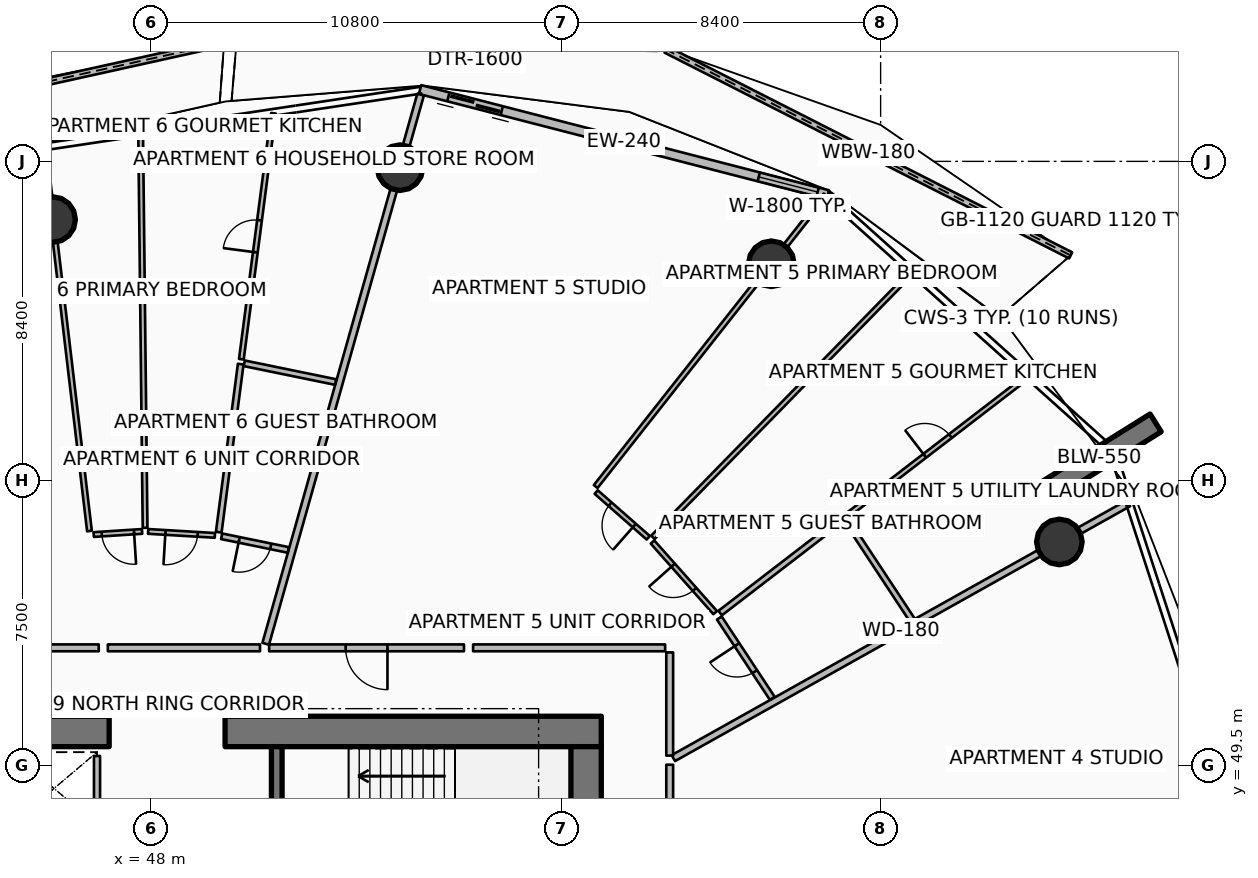
"""IFC4 building model, lengths in metres.
Left out: names, types, materials, properties, quantities, classifications, styles, units other than length and angle.
Written with IfcOpenShell. Run it as: python <this file> out.ifc"""

import sys

from ifc_helpers import new_model, si_unit, direction, frame, frame_2d, origin, origin_2d, place, context, subcontext, project, spatial, polyline, rectangle, circle, outline, extrude, element, fill, save


model = new_model("IFC4")
c1 = context("Model", 3, precision=1e-05, world=origin(), true_north=direction((0.0, 1.0)))
c2 = subcontext(c1, "Body", "Model", "MODEL_VIEW")
j1 = project(units=[si_unit("LENGTHUNIT", "METRE"), si_unit("PLANEANGLEUNIT", "RADIAN")], contexts=[c1])
p1 = place(None, origin())
s1 = spatial("IfcSite", under=j1, at=p1, CompositionType="ELEMENT")
p2 = place(p1, origin())
s2 = spatial("IfcBuilding", under=s1, at=p2, CompositionType="ELEMENT")
p3 = place(p2, frame((0.0, 0.0, 78.9)))
s3 = spatial("IfcBuildingStorey", under=s2, at=p3, CompositionType="ELEMENT", Elevation=78.9)
p4 = place(p3, frame((37.0, 50.4, 0.0), z_axis=(0.0, 0.0, 1.0), x_axis=(1.0, 0.0, 0.0)))
e1 = element("IfcWall", 1, at=p4, inside=s3, PredefinedType="SHEAR", context=c2, shape_type="SweptSolid", body=[
    extrude(rectangle(XDim=9.9, YDim=0.8, at=frame_2d((4.95, 0.0))), origin(), (0.0, 0.0, 1.0), 3.75),
])
p5 = place(p3, frame((49.95, 50.4, 0.0), z_axis=(0.0, 0.0, 1.0), x_axis=(1.0, 0.0, 0.0)))
e2 = element("IfcWall", 2, at=p5, inside=s3, PredefinedType="SHEAR", context=c2, shape_type="SweptSolid", body=[
    extrude(rectangle(XDim=9.9, YDim=0.8, at=frame_2d((4.95, 0.0))), origin(), (0.0, 0.0, 1.0), 3.75),
])
p6 = place(p3, frame((59.45, 34.0, 0.0), z_axis=(0.0, 0.0, 1.0), x_axis=(0.0, 1.0, 0.0)))
e3 = element("IfcWall", 3, at=p6, inside=s3, PredefinedType="SHEAR", context=c2, shape_type="SweptSolid", body=[
    extrude(rectangle(XDim=16.0, YDim=0.8, at=frame_2d((8.0, 0.0))), origin(), (0.0, 0.0, 1.0), 3.75),
])
p7 = place(p3, frame((51.31, 46.5, 0.0), z_axis=(0.0, 0.0, 1.0), x_axis=(0.0, 1.0, 0.0)))
e4 = element("IfcWall", 4, at=p7, inside=s3, PredefinedType="SHEAR", context=c2, shape_type="SweptSolid", body=[
    extrude(rectangle(XDim=3.5, YDim=0.28, at=frame_2d((1.75, 0.0))), origin(), (0.0, 0.0, 1.0), 3.75),
])
p8 = place(p3, frame((71.469, 56.665, 0.0), z_axis=(0.0, 0.0, 1.0), x_axis=(0.848053161125, 0.529911158502, 0.0)))
e5 = element("IfcWall", 5, at=p8, inside=s3, PredefinedType="SOLIDWALL", context=c2, shape_type="SweptSolid", body=[
    extrude(rectangle(XDim=3.5, YDim=0.55, at=frame_2d((1.75, 0.0))), origin(), (0.0, 0.0, 1.0), 3.75),
])
for number, where, z_axis, x_axis in (
    (6, (71.903, 55.386, 0.0), (0.0, 0.0, 1.0), (1.0, 0.0, 0.0)),
    (7, (64.323, 62.706, 0.0), (0.0, 0.0, 1.0), (1.0, 0.0, 0.0)),
    (8, (54.553, 65.234, 0.0), (0.0, 0.0, 1.0), (1.0, 0.0, 0.0)),
    (9, (45.412, 63.869, 0.0), (0.0, 0.0, 1.0), (1.0, 0.0, 0.0)),
):
    element("IfcColumn", number, at=place(p3, frame(where, z_axis=z_axis, x_axis=x_axis)), inside=s3, PredefinedType="COLUMN", context=c2, shape_type="SweptSolid", body=[
        extrude(circle(Radius=0.6, at=origin_2d()), origin(), (0.0, 0.0, 1.0), 3.5),
    ])
p9 = place(p3, frame((72.201, 62.926, 0.0), z_axis=(0.0, 0.0, 1.0), x_axis=(-0.891327308183, 0.453360375074, 0.0)))
e10 = element("IfcWall", 10, at=p9, inside=s3, PredefinedType="PARAPET", context=c2, shape_type="SweptSolid", body=[
    extrude(outline(polyline([(0.0, 0.0), (11.943, 0.0), (11.942, 1.348), (5.971, 1.562), (0.0, 1.747), (0.0, 0.0)])), frame((0.0, 0.09, 0.0), z_axis=(0.0, -1.0, 0.0), x_axis=(1.0, 0.0, 0.0)), (0.0, 0.0, 1.0), 0.18),
])
p10 = place(p3, frame((49.925, 68.527, 0.0), z_axis=(0.0, 0.0, 1.0), x_axis=(-0.976378265654, -0.216068235423, 0.0)))
e11 = element("IfcWall", 11, at=p10, inside=s3, PredefinedType="PARAPET", context=c2, shape_type="SweptSolid", body=[
    extrude(outline(polyline([(0.0, 0.0), (9.955, 0.0), (9.955, 1.348), (4.977, 1.182), (0.0, 1.12), (0.0, 0.0)])), frame((0.0, 0.09, 0.0), z_axis=(0.0, -1.0, 0.0), x_axis=(1.0, 0.0, 0.0)), (0.0, 0.0, 1.0), 0.18),
])
p11 = place(p3, frame((65.814, 64.523, 0.0), z_axis=(0.0, 0.0, 1.0), x_axis=(-0.968356180858, 0.249572248045, 0.0)))
e12 = element("IfcWall", 12, at=p11, inside=s3, PredefinedType="SOLIDWALL", context=c2, shape_type="SweptSolid", body=[
    extrude(rectangle(XDim=11.084, YDim=0.24, at=frame_2d((5.542, 0.0))), origin(), (0.0, 0.0, 1.0), 2.45),
])
p12 = place(p11, frame((8.865, 0.0, 0.0)))
e13 = element("IfcOpeningElement", 13, at=p12, cuts=e12, PredefinedType="OPENING", context=c2, shape_type="SweptSolid", body=[
    extrude(rectangle(XDim=1.45, YDim=2.15, at=frame_2d((0.725, 1.075))), frame((0.0, 0.13, 0.0), z_axis=(0.0, -1.0, 0.0), x_axis=(1.0, 0.0, 0.0)), (0.0, 0.0, 1.0), 0.26),
])
p13 = place(p11, frame((0.28, 0.0, 0.65)))
e14 = element("IfcOpeningElement", 14, at=p13, cuts=e12, PredefinedType="OPENING", context=c2, shape_type="SweptSolid", body=[
    extrude(rectangle(XDim=1.6, YDim=1.5, at=frame_2d((0.8, 0.75))), frame((0.0, 0.13, 0.0), z_axis=(0.0, -1.0, 0.0), x_axis=(1.0, 0.0, 0.0)), (0.0, 0.0, 1.0), 0.26),
])
p14 = place(p3, frame((46.58, 48.045, 0.0), z_axis=(0.0, 0.0, 1.0), x_axis=(0.0, 1.0, 0.0)))
e15 = element("IfcWall", 15, at=p14, inside=s3, PredefinedType="PARTITIONING", context=c2, shape_type="SweptSolid", body=[
    extrude(rectangle(XDim=1.71, YDim=0.16, at=frame_2d((0.855, 0.0))), origin(), (0.0, 0.0, 1.0), 3.5),
])
p15 = place(p3, frame((61.746, 49.698, 0.0), z_axis=(0.0, 0.0, 1.0), x_axis=(0.872489938668, 0.488632077256, 0.0)))
e16 = element("IfcWall", 16, at=p15, inside=s3, PredefinedType="PARTITIONING", context=c2, shape_type="SweptSolid", body=[
    extrude(rectangle(XDim=13.725, YDim=0.18, at=frame_2d((6.862, 0.0))), origin(), (0.0, 0.0, 1.0), 2.94),
])
p16 = place(p3, frame((51.019, 52.706, 0.0), z_axis=(0.0, 0.0, 1.0), x_axis=(0.271450895995, 0.962452290279, 0.0)))
e17 = element("IfcWall", 17, at=p16, inside=s3, PredefinedType="PARTITIONING", context=c2, shape_type="SweptSolid", body=[
    extrude(rectangle(XDim=15.014, YDim=0.18, at=frame_2d((7.507, 0.0))), origin(), (0.0, 0.0, 1.0), 2.94),
])
p17 = place(p3, frame((61.65, 43.736, 0.0), z_axis=(0.0, 0.0, 1.0), x_axis=(0.0, 1.0, 0.0)))
e18 = element("IfcWall", 18, at=p17, inside=s3, PredefinedType="PARTITIONING", context=c2, shape_type="SweptSolid", body=[
    extrude(rectangle(XDim=5.789, YDim=0.18, at=frame_2d((2.895, 0.0))), origin(), (0.0, 0.0, 1.0), 2.94),
])
p18 = place(p17, frame((2.344, 0.0, 0.0)))
e19 = element("IfcOpeningElement", 19, at=p18, cuts=e18, PredefinedType="OPENING", context=c2, shape_type="SweptSolid", body=[
    extrude(rectangle(XDim=1.1, YDim=2.1, at=frame_2d((0.55, 1.05))), frame((0.0, 0.1, 0.0), z_axis=(0.0, -1.0, 0.0), x_axis=(1.0, 0.0, 0.0)), (0.0, 0.0, 1.0), 0.2),
])
p19 = place(p3, frame((56.236, 52.6, 0.0), z_axis=(0.0, 0.0, 1.0), x_axis=(-1.0, 0.0, 0.0)))
e20 = element("IfcWall", 20, at=p19, inside=s3, PredefinedType="PARTITIONING", context=c2, shape_type="SweptSolid", body=[
    extrude(rectangle(XDim=5.127, YDim=0.18, at=frame_2d((2.563, 0.0))), origin(), (0.0, 0.0, 1.0), 2.94),
])
p20 = place(p19, frame((2.013, 0.0, 0.0)))
e21 = element("IfcOpeningElement", 21, at=p20, cuts=e20, PredefinedType="OPENING", context=c2, shape_type="SweptSolid", body=[
    extrude(rectangle(XDim=1.1, YDim=2.1, at=frame_2d((0.55, 1.05))), frame((0.0, 0.1, 0.0), z_axis=(0.0, -1.0, 0.0), x_axis=(1.0, 0.0, 0.0)), (0.0, 0.0, 1.0), 0.2),
])
p21 = place(p3, frame((61.65, 49.764, 0.0), z_axis=(0.0, 0.0, 1.0), x_axis=(0.0, 1.0, 0.0)))
e22 = element("IfcWall", 22, at=p21, inside=s3, PredefinedType="PARTITIONING", context=c2, shape_type="SweptSolid", body=[
    extrude(rectangle(XDim=2.716, YDim=0.18, at=frame_2d((1.358, 0.0))), origin(), (0.0, 0.0, 1.0), 2.94),
])
p22 = place(p3, frame((61.53, 52.6, 0.0), z_axis=(0.0, 0.0, 1.0), x_axis=(-1.0, 0.0, 0.0)))
e23 = element("IfcWall", 23, at=p22, inside=s3, PredefinedType="PARTITIONING", context=c2, shape_type="SweptSolid", body=[
    extrude(rectangle(XDim=5.054, YDim=0.18, at=frame_2d((2.527, 0.0))), origin(), (0.0, 0.0, 1.0), 2.94),
])
p23 = place(p3, frame((59.702, 56.844, 0.0), z_axis=(0.0, 0.0, 1.0), x_axis=(0.619083405129, 0.785325243128, 0.0)))
e24 = element("IfcWall", 24, at=p23, inside=s3, PredefinedType="PARTITIONING", context=c2, shape_type="SweptSolid", body=[
    extrude(rectangle(XDim=9.769, YDim=0.125, at=frame_2d((4.885, 0.0))), origin(), (0.0, 0.0, 1.0), 2.94),
])
p24 = place(p3, frame((64.35, 51.271, 0.0), z_axis=(0.0, 0.0, 1.0), x_axis=(-0.550510405652, 0.83482830167, 0.0)))
e25 = element("IfcWall", 25, at=p24, inside=s3, PredefinedType="PARTITIONING", context=c2, shape_type="SweptSolid", body=[
    extrude(rectangle(XDim=2.532, YDim=0.15, at=frame_2d((1.266, 0.0))), origin(), (0.0, 0.0, 1.0), 2.94),
])
p25 = place(p24, frame((0.841, 0.0, 0.0)))
e26 = element("IfcOpeningElement", 26, at=p25, cuts=e25, PredefinedType="OPENING", context=c2, shape_type="SweptSolid", body=[
    extrude(rectangle(XDim=0.85, YDim=2.06, at=frame_2d((0.425, 1.03))), frame((0.0, 0.085, 0.0), z_axis=(0.0, -1.0, 0.0), x_axis=(1.0, 0.0, 0.0)), (0.0, 0.0, 1.0), 0.17),
])
p26 = place(p3, frame((68.031, 53.333, 0.0), z_axis=(0.0, 0.0, 1.0), x_axis=(-0.550480727927, 0.83484787128, 0.0)))
e27 = element("IfcWall", 27, at=p26, inside=s3, PredefinedType="PARTITIONING", context=c2, shape_type="SweptSolid", body=[
    extrude(rectangle(XDim=3.143, YDim=0.15, at=frame_2d((1.572, 0.0))), origin(), (0.0, 0.0, 1.0), 2.94),
])
p27 = place(p3, frame((62.978, 53.514, 0.0), z_axis=(0.0, 0.0, 1.0), x_axis=(0.792801485355, 0.609479946199, 0.0)))
e28 = element("IfcWall", 28, at=p27, inside=s3, PredefinedType="PARTITIONING", context=c2, shape_type="SweptSolid", body=[
    extrude(rectangle(XDim=4.09, YDim=0.15, at=frame_2d((2.045, 0.0))), origin(), (0.0, 0.0, 1.0), 2.94),
])
p28 = place(p3, frame((66.323, 56.086, 0.0), z_axis=(0.0, 0.0, 1.0), x_axis=(0.792792040596, 0.60949223159, 0.0)))
e29 = element("IfcWall", 29, at=p28, inside=s3, PredefinedType="PARTITIONING", context=c2, shape_type="SweptSolid", body=[
    extrude(rectangle(XDim=5.994, YDim=0.125, at=frame_2d((2.997, 0.0))), origin(), (0.0, 0.0, 1.0), 2.94),
])
p29 = place(p28, frame((2.572, 0.0, 0.0)))
e30 = element("IfcOpeningElement", 30, at=p29, cuts=e29, PredefinedType="OPENING", context=c2, shape_type="SweptSolid", body=[
    extrude(rectangle(XDim=0.85, YDim=2.06, at=frame_2d((0.425, 1.03))), frame((0.0, 0.073, 0.0), z_axis=(0.0, -1.0, 0.0), x_axis=(1.0, 0.0, 0.0)), (0.0, 0.0, 1.0), 0.145),
])
p30 = place(p3, frame((61.208, 55.508, 0.0), z_axis=(0.0, 0.0, 1.0), x_axis=(0.699096858951, 0.715026979774, 0.0)))
e31 = element("IfcWall", 31, at=p30, inside=s3, PredefinedType="PARTITIONING", context=c2, shape_type="SweptSolid", body=[
    extrude(rectangle(XDim=9.747, YDim=0.125, at=frame_2d((4.874, 0.0))), origin(), (0.0, 0.0, 1.0), 2.94),
])
p31 = place(p3, frame((62.846, 53.527, 0.0), z_axis=(0.0, 0.0, 1.0), x_axis=(-0.663881646848, 0.747837655497, 0.0)))
e32 = element("IfcWall", 32, at=p31, inside=s3, PredefinedType="PARTITIONING", context=c2, shape_type="SweptSolid", body=[
    extrude(rectangle(XDim=2.483, YDim=0.125, at=frame_2d((1.242, 0.0))), origin(), (0.0, 0.0, 1.0), 2.94),
])
p32 = place(p31, frame((0.817, 0.0, 0.0)))
e33 = element("IfcOpeningElement", 33, at=p32, cuts=e32, PredefinedType="OPENING", context=c2, shape_type="SweptSolid", body=[
    extrude(rectangle(XDim=0.85, YDim=2.06, at=frame_2d((0.425, 1.03))), frame((0.0, 0.073, 0.0), z_axis=(0.0, -1.0, 0.0), x_axis=(1.0, 0.0, 0.0)), (0.0, 0.0, 1.0), 0.145),
])
p33 = place(p3, frame((61.084, 55.497, 0.0), z_axis=(0.0, 0.0, 1.0), x_axis=(-0.75124742024, 0.660020691784, 0.0)))
e34 = element("IfcWall", 34, at=p33, inside=s3, PredefinedType="PARTITIONING", context=c2, shape_type="SweptSolid", body=[
    extrude(rectangle(XDim=1.823, YDim=0.125, at=frame_2d((0.911, 0.0))), origin(), (0.0, 0.0, 1.0), 2.94),
])
p34 = place(p33, frame((0.486, 0.0, 0.0)))
e35 = element("IfcOpeningElement", 35, at=p34, cuts=e34, PredefinedType="OPENING", context=c2, shape_type="SweptSolid", body=[
    extrude(rectangle(XDim=0.85, YDim=2.06, at=frame_2d((0.425, 1.03))), frame((0.0, 0.073, 0.0), z_axis=(0.0, -1.0, 0.0), x_axis=(1.0, 0.0, 0.0)), (0.0, 0.0, 1.0), 0.145),
])
p35 = place(p3, frame((46.625, 52.6, 0.0), z_axis=(0.0, 0.0, 1.0), x_axis=(-1.0, 0.0, 0.0)))
e36 = element("IfcWall", 36, at=p35, inside=s3, PredefinedType="PARTITIONING", context=c2, shape_type="SweptSolid", body=[
    extrude(rectangle(XDim=4.442, YDim=0.18, at=frame_2d((2.221, 0.0))), origin(), (0.0, 0.0, 1.0), 2.94),
])
p36 = place(p35, frame((1.671, 0.0, 0.0)))
e37 = element("IfcOpeningElement", 37, at=p36, cuts=e36, PredefinedType="OPENING", context=c2, shape_type="SweptSolid", body=[
    extrude(rectangle(XDim=1.1, YDim=2.1, at=frame_2d((0.55, 1.05))), frame((0.0, 0.1, 0.0), z_axis=(0.0, -1.0, 0.0), x_axis=(1.0, 0.0, 0.0)), (0.0, 0.0, 1.0), 0.2),
])
p37 = place(p3, frame((50.869, 52.6, 0.0), z_axis=(0.0, 0.0, 1.0), x_axis=(-1.0, 0.0, 0.0)))
e38 = element("IfcWall", 38, at=p37, inside=s3, PredefinedType="PARTITIONING", context=c2, shape_type="SweptSolid", body=[
    extrude(rectangle(XDim=4.004, YDim=0.18, at=frame_2d((2.002, 0.0))), origin(), (0.0, 0.0, 1.0), 2.94),
])
p38 = place(p3, frame((46.382, 55.674, 0.0), z_axis=(0.0, 0.0, 1.0), x_axis=(-0.117533197276, 0.99306895407, 0.0)))
e39 = element("IfcWall", 39, at=p38, inside=s3, PredefinedType="PARTITIONING", context=c2, shape_type="SweptSolid", body=[
    extrude(rectangle(XDim=10.153, YDim=0.125, at=frame_2d((5.077, 0.0))), origin(), (0.0, 0.0, 1.0), 2.94),
])
p39 = place(p3, frame((51.612, 55.176, 0.0), z_axis=(0.0, 0.0, 1.0), x_axis=(-0.979559973395, 0.201152326663, 0.0)))
e40 = element("IfcWall", 40, at=p39, inside=s3, PredefinedType="PARTITIONING", context=c2, shape_type="SweptSolid", body=[
    extrude(rectangle(XDim=1.789, YDim=0.15, at=frame_2d((0.895, 0.0))), origin(), (0.0, 0.0, 1.0), 2.94),
])
p40 = place(p39, frame((0.469, 0.0, 0.0)))
e41 = element("IfcOpeningElement", 41, at=p40, cuts=e40, PredefinedType="OPENING", context=c2, shape_type="SweptSolid", body=[
    extrude(rectangle(XDim=0.85, YDim=2.06, at=frame_2d((0.425, 1.03))), frame((0.0, 0.085, 0.0), z_axis=(0.0, -1.0, 0.0), x_axis=(1.0, 0.0, 0.0)), (0.0, 0.0, 1.0), 0.17),
])
p41 = place(p3, frame((52.858, 59.594, 0.0), z_axis=(0.0, 0.0, 1.0), x_axis=(-0.979569035828, 0.201108189903, 0.0)))
e42 = element("IfcWall", 42, at=p41, inside=s3, PredefinedType="PARTITIONING", context=c2, shape_type="SweptSolid", body=[
    extrude(rectangle(XDim=2.453, YDim=0.15, at=frame_2d((1.227, 0.0))), origin(), (0.0, 0.0, 1.0), 2.94),
])
p42 = place(p3, frame((49.783, 55.643, 0.0), z_axis=(0.0, 0.0, 1.0), x_axis=(0.129624682181, 0.991563130501, 0.0)))
e43 = element("IfcWall", 43, at=p42, inside=s3, PredefinedType="PARTITIONING", context=c2, shape_type="SweptSolid", body=[
    extrude(rectangle(XDim=4.46, YDim=0.15, at=frame_2d((2.23, 0.0))), origin(), (0.0, 0.0, 1.0), 2.94),
])
p43 = place(p3, frame((50.378, 60.194, 0.0), z_axis=(0.0, 0.0, 1.0), x_axis=(0.129622249643, 0.991563448498, 0.0)))
e44 = element("IfcWall", 44, at=p43, inside=s3, PredefinedType="PARTITIONING", context=c2, shape_type="SweptSolid", body=[
    extrude(rectangle(XDim=6.526, YDim=0.125, at=frame_2d((3.263, 0.0))), origin(), (0.0, 0.0, 1.0), 2.94),
])
p44 = place(p43, frame((2.838, 0.0, 0.0)))
e45 = element("IfcOpeningElement", 45, at=p44, cuts=e44, PredefinedType="OPENING", context=c2, shape_type="SweptSolid", body=[
    extrude(rectangle(XDim=0.85, YDim=2.06, at=frame_2d((0.425, 1.03))), frame((0.0, 0.073, 0.0), z_axis=(0.0, -1.0, 0.0), x_axis=(1.0, 0.0, 0.0)), (0.0, 0.0, 1.0), 0.145),
])
p45 = place(p3, frame((47.845, 55.758, 0.0), z_axis=(0.0, 0.0, 1.0), x_axis=(-0.011264572172, 0.999936552694, 0.0)))
e46 = element("IfcWall", 46, at=p45, inside=s3, PredefinedType="PARTITIONING", context=c2, shape_type="SweptSolid", body=[
    extrude(rectangle(XDim=10.382, YDim=0.125, at=frame_2d((5.191, 0.0))), origin(), (0.0, 0.0, 1.0), 2.94),
])
p46 = place(p3, frame((49.682, 55.559, 0.0), z_axis=(0.0, 0.0, 1.0), x_axis=(-0.99824215698, 0.059267158097, 0.0)))
e47 = element("IfcWall", 47, at=p46, inside=s3, PredefinedType="PARTITIONING", context=c2, shape_type="SweptSolid", body=[
    extrude(rectangle(XDim=1.759, YDim=0.125, at=frame_2d((0.879, 0.0))), origin(), (0.0, 0.0, 1.0), 2.94),
])
p47 = place(p46, frame((0.455, 0.0, 0.0)))
e48 = element("IfcOpeningElement", 48, at=p47, cuts=e47, PredefinedType="OPENING", context=c2, shape_type="SweptSolid", body=[
    extrude(rectangle(XDim=0.85, YDim=2.06, at=frame_2d((0.425, 1.03))), frame((0.0, 0.073, 0.0), z_axis=(0.0, -1.0, 0.0), x_axis=(1.0, 0.0, 0.0)), (0.0, 0.0, 1.0), 0.145),
])
p48 = place(p3, frame((47.766, 55.663, 0.0), z_axis=(0.0, 0.0, 1.0), x_axis=(-0.997930857608, -0.064296216329, 0.0)))
e49 = element("IfcWall", 49, at=p48, inside=s3, PredefinedType="PARTITIONING", context=c2, shape_type="SweptSolid", body=[
    extrude(rectangle(XDim=1.276, YDim=0.125, at=frame_2d((0.638, 0.0))), origin(), (0.0, 0.0, 1.0), 2.94),
])
p49 = place(p48, frame((0.213, 0.0, 0.0)))
e50 = element("IfcOpeningElement", 50, at=p49, cuts=e49, PredefinedType="OPENING", context=c2, shape_type="SweptSolid", body=[
    extrude(rectangle(XDim=0.85, YDim=2.06, at=frame_2d((0.425, 1.03))), frame((0.0, 0.073, 0.0), z_axis=(0.0, -1.0, 0.0), x_axis=(1.0, 0.0, 0.0)), (0.0, 0.0, 1.0), 0.145),
])
p50 = place(p12, origin())
e51 = element("IfcDoor", 51, at=p50, inside=s3, OperationType="DOUBLE_DOOR_SLIDING", PredefinedType="DOOR", context=c2, shape_type="SweptSolid", body=[
    extrude(rectangle(XDim=1.45, YDim=2.15, at=frame_2d((0.725, 1.075))), frame((0.0, 0.025, 0.0), z_axis=(0.0, -1.0, 0.0), x_axis=(1.0, 0.0, 0.0)), (0.0, 0.0, 1.0), 0.05),
])
fill(e13, e51)
p51 = place(p13, origin())
e52 = element("IfcWindow", 52, at=p51, inside=s3, PartitioningType="SINGLE_PANEL", PredefinedType="WINDOW", context=c2, shape_type="SweptSolid", body=[
    extrude(rectangle(XDim=1.6, YDim=1.5, at=frame_2d((0.8, 0.75))), frame((0.0, 0.03, 0.0), z_axis=(0.0, -1.0, 0.0), x_axis=(1.0, 0.0, 0.0)), (0.0, 0.0, 1.0), 0.06),
])
fill(e14, e52)
p52 = place(p20, origin())
e53 = element("IfcDoor", 53, at=p52, inside=s3, OperationType="SINGLE_SWING_LEFT", PredefinedType="DOOR", context=c2, shape_type="SweptSolid", body=[
    extrude(rectangle(XDim=1.1, YDim=2.1, at=frame_2d((0.55, 1.05))), frame((0.0, 0.025, 0.0), z_axis=(0.0, -1.0, 0.0), x_axis=(1.0, 0.0, 0.0)), (0.0, 0.0, 1.0), 0.05),
])
fill(e21, e53)
p53 = place(p25, origin())
e54 = element("IfcDoor", 54, at=p53, inside=s3, OperationType="SINGLE_SWING_RIGHT", PredefinedType="DOOR", context=c2, shape_type="SweptSolid", body=[
    extrude(rectangle(XDim=0.85, YDim=2.06, at=frame_2d((0.425, 1.03))), frame((0.0, 0.025, 0.0), z_axis=(0.0, -1.0, 0.0), x_axis=(1.0, 0.0, 0.0)), (0.0, 0.0, 1.0), 0.05),
])
fill(e26, e54)
p54 = place(p29, origin())
e55 = element("IfcDoor", 55, at=p54, inside=s3, OperationType="SINGLE_SWING_LEFT", PredefinedType="DOOR", context=c2, shape_type="SweptSolid", body=[
    extrude(rectangle(XDim=0.85, YDim=2.06, at=frame_2d((0.425, 1.03))), frame((0.0, 0.025, 0.0), z_axis=(0.0, -1.0, 0.0), x_axis=(1.0, 0.0, 0.0)), (0.0, 0.0, 1.0), 0.05),
])
fill(e30, e55)
p55 = place(p32, origin())
e56 = element("IfcDoor", 56, at=p55, inside=s3, OperationType="SINGLE_SWING_RIGHT", PredefinedType="DOOR", context=c2, shape_type="SweptSolid", body=[
    extrude(rectangle(XDim=0.85, YDim=2.06, at=frame_2d((0.425, 1.03))), frame((0.0, 0.025, 0.0), z_axis=(0.0, -1.0, 0.0), x_axis=(1.0, 0.0, 0.0)), (0.0, 0.0, 1.0), 0.05),
])
fill(e33, e56)
p56 = place(p34, origin())
e57 = element("IfcDoor", 57, at=p56, inside=s3, OperationType="SINGLE_SWING_LEFT", PredefinedType="DOOR", context=c2, shape_type="SweptSolid", body=[
    extrude(rectangle(XDim=0.85, YDim=2.06, at=frame_2d((0.425, 1.03))), frame((0.0, 0.025, 0.0), z_axis=(0.0, -1.0, 0.0), x_axis=(1.0, 0.0, 0.0)), (0.0, 0.0, 1.0), 0.05),
])
fill(e35, e57)
p57 = place(p40, origin())
e58 = element("IfcDoor", 58, at=p57, inside=s3, OperationType="SINGLE_SWING_RIGHT", PredefinedType="DOOR", context=c2, shape_type="SweptSolid", body=[
    extrude(rectangle(XDim=0.85, YDim=2.06, at=frame_2d((0.425, 1.03))), frame((0.0, 0.025, 0.0), z_axis=(0.0, -1.0, 0.0), x_axis=(1.0, 0.0, 0.0)), (0.0, 0.0, 1.0), 0.05),
])
fill(e41, e58)
p58 = place(p44, origin())
e59 = element("IfcDoor", 59, at=p58, inside=s3, OperationType="SINGLE_SWING_LEFT", PredefinedType="DOOR", context=c2, shape_type="SweptSolid", body=[
    extrude(rectangle(XDim=0.85, YDim=2.06, at=frame_2d((0.425, 1.03))), frame((0.0, 0.025, 0.0), z_axis=(0.0, -1.0, 0.0), x_axis=(1.0, 0.0, 0.0)), (0.0, 0.0, 1.0), 0.05),
])
fill(e45, e59)
p59 = place(p47, origin())
e60 = element("IfcDoor", 60, at=p59, inside=s3, OperationType="SINGLE_SWING_RIGHT", PredefinedType="DOOR", context=c2, shape_type="SweptSolid", body=[
    extrude(rectangle(XDim=0.85, YDim=2.06, at=frame_2d((0.425, 1.03))), frame((0.0, 0.025, 0.0), z_axis=(0.0, -1.0, 0.0), x_axis=(1.0, 0.0, 0.0)), (0.0, 0.0, 1.0), 0.05),
])
fill(e48, e60)
p60 = place(p49, origin())
e61 = element("IfcDoor", 61, at=p60, inside=s3, OperationType="SINGLE_SWING_LEFT", PredefinedType="DOOR", context=c2, shape_type="SweptSolid", body=[
    extrude(rectangle(XDim=0.85, YDim=2.06, at=frame_2d((0.425, 1.03))), frame((0.0, 0.025, 0.0), z_axis=(0.0, -1.0, 0.0), x_axis=(1.0, 0.0, 0.0)), (0.0, 0.0, 1.0), 0.05),
])
fill(e50, e61)
save(model, sys.argv[1])
